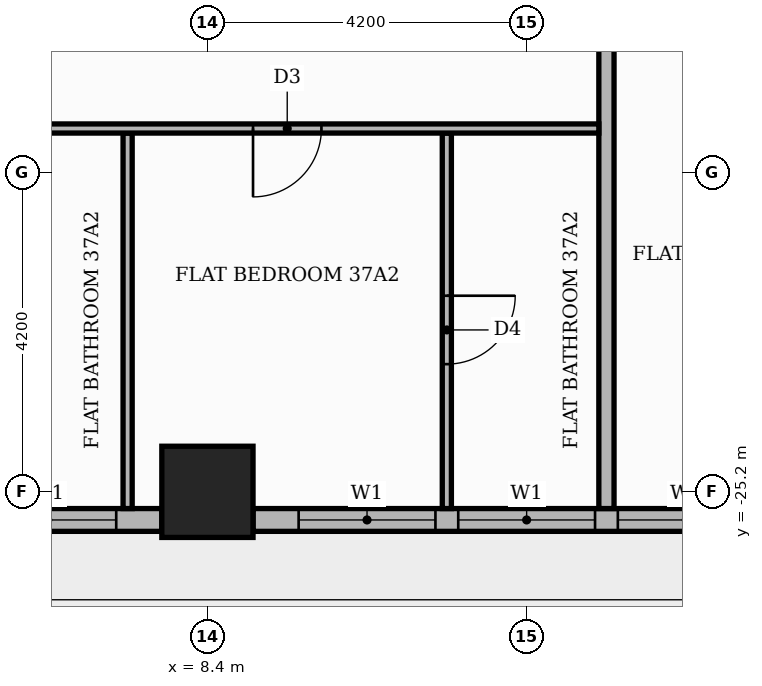
"""IFC4 building model, lengths in metres.
Left out: names, types, materials, properties, quantities, classifications, styles, units other than length and angle.
Written with IfcOpenShell. Run it as: python <this file> out.ifc"""

import sys

from ifc_helpers import new_model, si_unit, direction, frame, frame_2d, origin, origin_2d, place, context, subcontext, project, spatial, rectangle, extrude, element, fill, save


model = new_model("IFC4")
c1 = context("Model", 3, precision=1e-05, world=origin(), true_north=direction((0.0, 1.0)))
c2 = subcontext(c1, "Body", "Model", "MODEL_VIEW")
j1 = project(units=[si_unit("LENGTHUNIT", "METRE"), si_unit("PLANEANGLEUNIT", "RADIAN")], contexts=[c1])
p1 = place(None, origin())
s1 = spatial("IfcSite", under=j1, at=p1, CompositionType="ELEMENT")
p2 = place(p1, origin())
s2 = spatial("IfcBuilding", under=s1, at=p2, CompositionType="ELEMENT")
p3 = place(p2, frame((0.0, 0.0, 157.2)))
s3 = spatial("IfcBuildingStorey", under=s2, at=p3, CompositionType="ELEMENT", Elevation=157.2)
p4 = place(p3, frame((8.4, -25.2, 0.0), z_axis=(0.0, 0.0, 1.0), x_axis=(1.0, 0.0, 0.0)))
e1 = element("IfcColumn", 1, at=p4, inside=s3, PredefinedType="COLUMN", context=c2, shape_type="SweptSolid", body=[
    extrude(rectangle(XDim=1.2, YDim=1.2, at=origin_2d()), origin(), (0.0, 0.0, 1.0), 3.9),
])
p5 = place(p3, frame((0.6, -25.57, 0.0), z_axis=(0.0, 0.0, 1.0), x_axis=(1.0, 0.0, 0.0)))
e2 = element("IfcWall", 2, at=p5, inside=s3, PredefinedType="STANDARD", context=c2, shape_type="SweptSolid", body=[
    extrude(rectangle(XDim=7.2, YDim=0.3, at=frame_2d((3.6, 0.0))), origin(), (0.0, 0.0, 1.0), 3.48),
])
p6 = place(p5, frame((0.6, 0.0, 0.0)))
e3 = element("IfcOpeningElement", 3, at=p6, cuts=e2, PredefinedType="OPENING", context=c2, shape_type="SweptSolid", body=[
    extrude(rectangle(XDim=1.8, YDim=2.4, at=frame_2d((0.9, 1.2))), frame((0.0, 0.16, 0.0), z_axis=(0.0, -1.0, 0.0), x_axis=(1.0, 0.0, 0.0)), (0.0, 0.0, 1.0), 0.32),
])
p7 = place(p5, frame((2.7, 0.0, 0.9)))
e4 = element("IfcOpeningElement", 4, at=p7, cuts=e2, PredefinedType="OPENING", context=c2, shape_type="SweptSolid", body=[
    extrude(rectangle(XDim=1.8, YDim=2.1, at=frame_2d((0.9, 1.05))), frame((0.0, 0.16, 0.0), z_axis=(0.0, -1.0, 0.0), x_axis=(1.0, 0.0, 0.0)), (0.0, 0.0, 1.0), 0.32),
])
p8 = place(p5, frame((4.8, 0.0, 0.9)))
e5 = element("IfcOpeningElement", 5, at=p8, cuts=e2, PredefinedType="OPENING", context=c2, shape_type="SweptSolid", body=[
    extrude(rectangle(XDim=1.8, YDim=2.1, at=frame_2d((0.9, 1.05))), frame((0.0, 0.16, 0.0), z_axis=(0.0, -1.0, 0.0), x_axis=(1.0, 0.0, 0.0)), (0.0, 0.0, 1.0), 0.32),
])
p9 = place(p3, frame((9.0, -25.57, 0.0), z_axis=(0.0, 0.0, 1.0), x_axis=(1.0, 0.0, 0.0)))
e6 = element("IfcWall", 6, at=p9, inside=s3, PredefinedType="STANDARD", context=c2, shape_type="SweptSolid", body=[
    extrude(rectangle(XDim=7.2, YDim=0.3, at=frame_2d((3.6, 0.0))), origin(), (0.0, 0.0, 1.0), 3.48),
])
p10 = place(p9, frame((0.6, 0.0, 0.9)))
e7 = element("IfcOpeningElement", 7, at=p10, cuts=e6, PredefinedType="OPENING", context=c2, shape_type="SweptSolid", body=[
    extrude(rectangle(XDim=1.8, YDim=2.1, at=frame_2d((0.9, 1.05))), frame((0.0, 0.16, 0.0), z_axis=(0.0, -1.0, 0.0), x_axis=(1.0, 0.0, 0.0)), (0.0, 0.0, 1.0), 0.32),
])
p11 = place(p9, frame((2.7, 0.0, 0.9)))
e8 = element("IfcOpeningElement", 8, at=p11, cuts=e6, PredefinedType="OPENING", context=c2, shape_type="SweptSolid", body=[
    extrude(rectangle(XDim=1.8, YDim=2.1, at=frame_2d((0.9, 1.05))), frame((0.0, 0.16, 0.0), z_axis=(0.0, -1.0, 0.0), x_axis=(1.0, 0.0, 0.0)), (0.0, 0.0, 1.0), 0.32),
])
p12 = place(p9, frame((4.8, 0.0, 0.9)))
e9 = element("IfcOpeningElement", 9, at=p12, cuts=e6, PredefinedType="OPENING", context=c2, shape_type="SweptSolid", body=[
    extrude(rectangle(XDim=1.8, YDim=2.1, at=frame_2d((0.9, 1.05))), frame((0.0, 0.16, 0.0), z_axis=(0.0, -1.0, 0.0), x_axis=(1.0, 0.0, 0.0)), (0.0, 0.0, 1.0), 0.32),
])
p13 = place(p3, frame((7.35, -25.42, 0.0), z_axis=(0.0, 0.0, 1.0), x_axis=(0.0, 1.0, 0.0)))
e10 = element("IfcWall", 10, at=p13, inside=s3, PredefinedType="PARTITIONING", context=c2, shape_type="SweptSolid", body=[
    extrude(rectangle(XDim=4.94, YDim=0.12, at=frame_2d((2.47, 0.0))), origin(), (0.0, 0.0, 1.0), 3.48),
])
p14 = place(p3, frame((11.55, -25.42, 0.0), z_axis=(0.0, 0.0, 1.0), x_axis=(0.0, 1.0, 0.0)))
e11 = element("IfcWall", 11, at=p14, inside=s3, PredefinedType="PARTITIONING", context=c2, shape_type="SweptSolid", body=[
    extrude(rectangle(XDim=4.94, YDim=0.12, at=frame_2d((2.47, 0.0))), origin(), (0.0, 0.0, 1.0), 3.48),
])
p15 = place(p14, frame((1.9, 0.0, 0.0)))
e12 = element("IfcOpeningElement", 12, at=p15, cuts=e11, PredefinedType="OPENING", context=c2, shape_type="SweptSolid", body=[
    extrude(rectangle(XDim=0.9, YDim=2.1, at=frame_2d((0.45, 1.05))), frame((0.0, 0.07, 0.0), z_axis=(0.0, -1.0, 0.0), x_axis=(1.0, 0.0, 0.0)), (0.0, 0.0, 1.0), 0.14),
])
p16 = place(p3, frame((13.65, -25.42, 0.0), z_axis=(0.0, 0.0, 1.0), x_axis=(0.0, 1.0, 0.0)))
e13 = element("IfcWall", 13, at=p16, inside=s3, PredefinedType="PARTITIONING", context=c2, shape_type="SweptSolid", body=[
    extrude(rectangle(XDim=11.67, YDim=0.2, at=frame_2d((5.835, 0.0))), origin(), (0.0, 0.0, 1.0), 3.48),
])
p17 = place(p3, frame((-5.15, -20.42, 0.0), z_axis=(0.0, 0.0, 1.0), x_axis=(1.0, 0.0, 0.0)))
e14 = element("IfcWall", 14, at=p17, inside=s3, PredefinedType="PARTITIONING", context=c2, shape_type="SweptSolid", body=[
    extrude(rectangle(XDim=18.7, YDim=0.12, at=frame_2d((9.35, 0.0))), origin(), (0.0, 0.0, 1.0), 3.48),
])
p18 = place(p17, frame((1.5, 0.0, 0.0)))
e15 = element("IfcOpeningElement", 15, at=p18, cuts=e14, PredefinedType="OPENING", context=c2, shape_type="SweptSolid", body=[
    extrude(rectangle(XDim=1.0, YDim=2.1, at=frame_2d((0.5, 1.05))), frame((0.0, 0.07, 0.0), z_axis=(0.0, -1.0, 0.0), x_axis=(1.0, 0.0, 0.0)), (0.0, 0.0, 1.0), 0.14),
])
p19 = place(p17, frame((5.75, 0.0, 0.0)))
e16 = element("IfcOpeningElement", 16, at=p19, cuts=e14, PredefinedType="OPENING", context=c2, shape_type="SweptSolid", body=[
    extrude(rectangle(XDim=0.9, YDim=2.1, at=frame_2d((0.45, 1.05))), frame((0.0, 0.07, 0.0), z_axis=(0.0, -1.0, 0.0), x_axis=(1.0, 0.0, 0.0)), (0.0, 0.0, 1.0), 0.14),
])
p20 = place(p17, frame((14.15, 0.0, 0.0)))
e17 = element("IfcOpeningElement", 17, at=p20, cuts=e14, PredefinedType="OPENING", context=c2, shape_type="SweptSolid", body=[
    extrude(rectangle(XDim=0.9, YDim=2.1, at=frame_2d((0.45, 1.05))), frame((0.0, 0.07, 0.0), z_axis=(0.0, -1.0, 0.0), x_axis=(1.0, 0.0, 0.0)), (0.0, 0.0, 1.0), 0.14),
])
p21 = place(p8, origin())
e18 = element("IfcWindow", 18, at=p21, inside=s3, PartitioningType="SINGLE_PANEL", PredefinedType="WINDOW", context=c2, shape_type="SweptSolid", body=[
    extrude(rectangle(XDim=1.8, YDim=2.1, at=frame_2d((0.9, 1.05))), frame((0.0, 0.03, 0.0), z_axis=(0.0, -1.0, 0.0), x_axis=(1.0, 0.0, 0.0)), (0.0, 0.0, 1.0), 0.06),
])
fill(e5, e18)
p22 = place(p10, origin())
e19 = element("IfcWindow", 19, at=p22, inside=s3, PartitioningType="SINGLE_PANEL", PredefinedType="WINDOW", context=c2, shape_type="SweptSolid", body=[
    extrude(rectangle(XDim=1.8, YDim=2.1, at=frame_2d((0.9, 1.05))), frame((0.0, 0.03, 0.0), z_axis=(0.0, -1.0, 0.0), x_axis=(1.0, 0.0, 0.0)), (0.0, 0.0, 1.0), 0.06),
])
fill(e7, e19)
p23 = place(p11, origin())
e20 = element("IfcWindow", 20, at=p23, inside=s3, PartitioningType="SINGLE_PANEL", PredefinedType="WINDOW", context=c2, shape_type="SweptSolid", body=[
    extrude(rectangle(XDim=1.8, YDim=2.1, at=frame_2d((0.9, 1.05))), frame((0.0, 0.03, 0.0), z_axis=(0.0, -1.0, 0.0), x_axis=(1.0, 0.0, 0.0)), (0.0, 0.0, 1.0), 0.06),
])
fill(e8, e20)
p24 = place(p12, origin())
e21 = element("IfcWindow", 21, at=p24, inside=s3, PartitioningType="SINGLE_PANEL", PredefinedType="WINDOW", context=c2, shape_type="SweptSolid", body=[
    extrude(rectangle(XDim=1.8, YDim=2.1, at=frame_2d((0.9, 1.05))), frame((0.0, 0.03, 0.0), z_axis=(0.0, -1.0, 0.0), x_axis=(1.0, 0.0, 0.0)), (0.0, 0.0, 1.0), 0.06),
])
fill(e9, e21)
p25 = place(p20, frame((0.9, 0.0, 0.0), z_axis=(0.0, 0.0, 1.0), x_axis=(-1.0, 0.0, 0.0)))
e22 = element("IfcDoor", 22, at=p25, inside=s3, OperationType="SINGLE_SWING_LEFT", PredefinedType="DOOR", context=c2, shape_type="SweptSolid", body=[
    extrude(rectangle(XDim=0.9, YDim=2.1, at=frame_2d((0.45, 1.05))), frame((0.0, 0.025, 0.0), z_axis=(0.0, -1.0, 0.0), x_axis=(1.0, 0.0, 0.0)), (0.0, 0.0, 1.0), 0.05),
])
fill(e17, e22)
p26 = place(p15, frame((0.9, 0.0, 0.0), z_axis=(0.0, 0.0, 1.0), x_axis=(-1.0, 0.0, 0.0)))
e23 = element("IfcDoor", 23, at=p26, inside=s3, OperationType="SINGLE_SWING_RIGHT", PredefinedType="DOOR", context=c2, shape_type="SweptSolid", body=[
    extrude(rectangle(XDim=0.9, YDim=2.1, at=frame_2d((0.45, 1.05))), frame((0.0, 0.025, 0.0), z_axis=(0.0, -1.0, 0.0), x_axis=(1.0, 0.0, 0.0)), (0.0, 0.0, 1.0), 0.05),
])
fill(e12, e23)
save(model, sys.argv[1])
